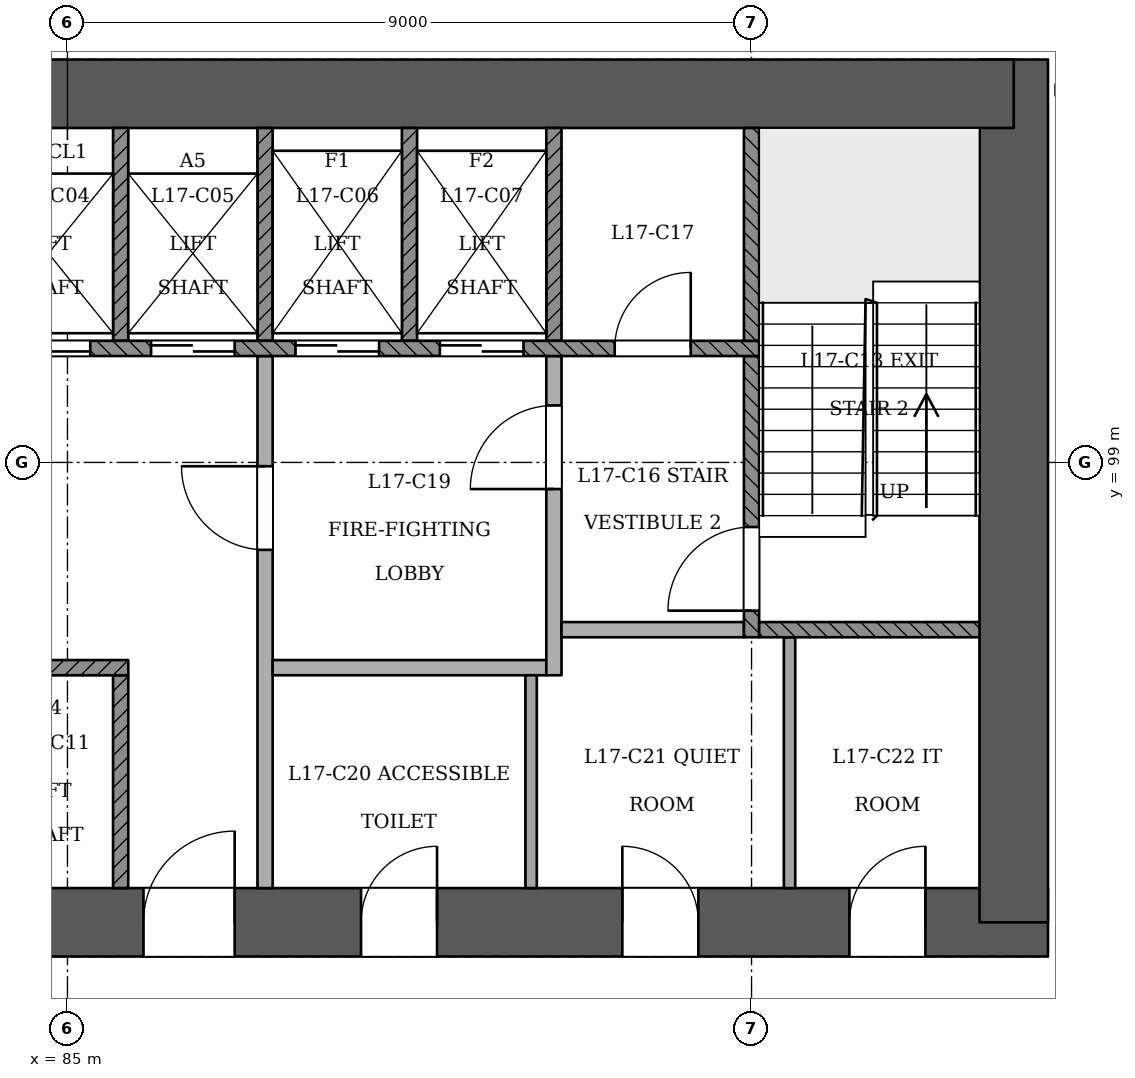
"""IFC4 building model, lengths in metres.
Left out: names, types, materials, properties, quantities, classifications, styles, units other than length and angle.
Written with IfcOpenShell. Run it as: python <this file> out.ifc"""

import sys

from ifc_helpers import new_model, si_unit, direction, frame, frame_2d, origin, place, context, subcontext, project, spatial, rectangle, extrude, element, fill, save


model = new_model("IFC4")
c1 = context("Model", 3, precision=1e-05, world=origin(), true_north=direction((0.0, 1.0)))
c2 = subcontext(c1, "Body", "Model", "MODEL_VIEW")
j1 = project(units=[si_unit("LENGTHUNIT", "METRE"), si_unit("PLANEANGLEUNIT", "RADIAN")], contexts=[c1])
p1 = place(None, origin())
s1 = spatial("IfcSite", under=j1, at=p1, CompositionType="ELEMENT")
p2 = place(p1, origin())
s2 = spatial("IfcBuilding", under=s1, at=p2, CompositionType="ELEMENT")
p3 = place(p2, frame((0.0, 0.0, 70.2)))
s3 = spatial("IfcBuildingStorey", under=s2, at=p3, CompositionType="ELEMENT", Elevation=70.2)
p4 = place(p3, frame((72.55, 92.95, 0.0), z_axis=(0.0, 0.0, 1.0), x_axis=(1.0, 0.0, 0.0)))
e1 = element("IfcWall", 1, at=p4, inside=s3, PredefinedType="SHEAR", context=c2, shape_type="SweptSolid", body=[
    extrude(rectangle(XDim=25.35, YDim=0.9, at=frame_2d((12.675, 0.0))), origin(), (0.0, 0.0, 1.0), 3.6),
])
p5 = place(p4, frame((1.25, 0.0, 0.0)))
e2 = element("IfcOpeningElement", 2, at=p5, cuts=e1, PredefinedType="OPENING", context=c2, shape_type="SweptSolid", body=[
    extrude(rectangle(XDim=1.2, YDim=2.1, at=frame_2d((0.6, 1.05))), frame((0.0, 0.46, 0.0), z_axis=(0.0, -1.0, 0.0), x_axis=(1.0, 0.0, 0.0)), (0.0, 0.0, 1.0), 0.921),
])
p6 = place(p4, frame((3.45, 0.0, 0.0)))
e3 = element("IfcOpeningElement", 3, at=p6, cuts=e1, PredefinedType="OPENING", context=c2, shape_type="SweptSolid", body=[
    extrude(rectangle(XDim=1.2, YDim=2.1, at=frame_2d((0.6, 1.05))), frame((0.0, 0.46, 0.0), z_axis=(0.0, -1.0, 0.0), x_axis=(1.0, 0.0, 0.0)), (0.0, 0.0, 1.0), 0.921),
])
p7 = place(p4, frame((13.45, 0.0, 0.0)))
e4 = element("IfcOpeningElement", 4, at=p7, cuts=e1, PredefinedType="OPENING", context=c2, shape_type="SweptSolid", body=[
    extrude(rectangle(XDim=1.2, YDim=2.1, at=frame_2d((0.6, 1.05))), frame((0.0, 0.46, 0.0), z_axis=(0.0, -1.0, 0.0), x_axis=(1.0, 0.0, 0.0)), (0.0, 0.0, 1.0), 0.921),
])
p8 = place(p4, frame((16.312, 0.0, 0.0)))
e5 = element("IfcOpeningElement", 5, at=p8, cuts=e1, PredefinedType="OPENING", context=c2, shape_type="SweptSolid", body=[
    extrude(rectangle(XDim=1.0, YDim=2.1, at=frame_2d((0.5, 1.05))), frame((0.0, 0.46, 0.0), z_axis=(0.0, -1.0, 0.0), x_axis=(1.0, 0.0, 0.0)), (0.0, 0.0, 1.0), 0.921),
])
p9 = place(p4, frame((19.75, 0.0, 0.0)))
e6 = element("IfcOpeningElement", 6, at=p9, cuts=e1, PredefinedType="OPENING", context=c2, shape_type="SweptSolid", body=[
    extrude(rectangle(XDim=1.0, YDim=2.1, at=frame_2d((0.5, 1.05))), frame((0.0, 0.46, 0.0), z_axis=(0.0, -1.0, 0.0), x_axis=(1.0, 0.0, 0.0)), (0.0, 0.0, 1.0), 0.921),
])
p10 = place(p4, frame((22.738, 0.0, 0.0)))
e7 = element("IfcOpeningElement", 7, at=p10, cuts=e1, PredefinedType="OPENING", context=c2, shape_type="SweptSolid", body=[
    extrude(rectangle(XDim=1.0, YDim=2.1, at=frame_2d((0.5, 1.05))), frame((0.0, 0.46, 0.0), z_axis=(0.0, -1.0, 0.0), x_axis=(1.0, 0.0, 0.0)), (0.0, 0.0, 1.0), 0.921),
])
p11 = place(p3, frame((97.45, 92.95, 0.0), z_axis=(0.0, 0.0, 1.0), x_axis=(0.0, 1.0, 0.0)))
e8 = element("IfcWall", 8, at=p11, inside=s3, PredefinedType="SHEAR", context=c2, shape_type="SweptSolid", body=[
    extrude(rectangle(XDim=11.35, YDim=0.9, at=frame_2d((5.675, 0.0))), origin(), (0.0, 0.0, 1.0), 3.6),
])
p12 = place(p3, frame((97.45, 103.85, 0.0), z_axis=(0.0, 0.0, 1.0), x_axis=(-1.0, 0.0, 0.0)))
e9 = element("IfcWall", 9, at=p12, inside=s3, PredefinedType="SHEAR", context=c2, shape_type="SweptSolid", body=[
    extrude(rectangle(XDim=25.35, YDim=0.9, at=frame_2d((12.675, 0.0))), origin(), (0.0, 0.0, 1.0), 3.6),
])
p13 = place(p3, frame((85.785, 59.686, 0.0), z_axis=(0.0, 0.0, 1.0), x_axis=(0.500002288388, 0.866024082579, 0.0)))
e10 = element("IfcWall", 10, at=p13, inside=s3, PredefinedType="PARTITIONING", context=c2, shape_type="SweptSolid", body=[
    extrude(rectangle(XDim=43.248, YDim=0.15, at=frame_2d((21.624, 0.0))), origin(), (0.0, 0.0, 1.0), 2.7),
])
p14 = place(p13, frame((0.256, 0.0, 0.0)))
e11 = element("IfcOpeningElement", 11, at=p14, cuts=e10, PredefinedType="OPENING", context=c2, shape_type="SweptSolid", body=[
    extrude(rectangle(XDim=1.2, YDim=2.1, at=frame_2d((0.6, 1.05))), frame((0.0, 0.085, 0.0), z_axis=(0.0, -1.0, 0.0), x_axis=(1.0, 0.0, 0.0)), (0.0, 0.0, 1.0), 0.171),
])
p15 = place(p13, frame((4.229, 0.0, 0.0)))
e12 = element("IfcOpeningElement", 12, at=p15, cuts=e10, PredefinedType="OPENING", context=c2, shape_type="SweptSolid", body=[
    extrude(rectangle(XDim=1.0, YDim=2.1, at=frame_2d((0.5, 1.05))), frame((0.0, 0.085, 0.0), z_axis=(0.0, -1.0, 0.0), x_axis=(1.0, 0.0, 0.0)), (0.0, 0.0, 1.0), 0.171),
])
p16 = place(p13, frame((10.904, 0.0, 0.0)))
e13 = element("IfcOpeningElement", 13, at=p16, cuts=e10, PredefinedType="OPENING", context=c2, shape_type="SweptSolid", body=[
    extrude(rectangle(XDim=1.0, YDim=2.1, at=frame_2d((0.5, 1.05))), frame((0.0, 0.085, 0.0), z_axis=(0.0, -1.0, 0.0), x_axis=(1.0, 0.0, 0.0)), (0.0, 0.0, 1.0), 0.171),
])
p17 = place(p13, frame((13.345, 0.0, 0.0)))
e14 = element("IfcOpeningElement", 14, at=p17, cuts=e10, PredefinedType="OPENING", context=c2, shape_type="SweptSolid", body=[
    extrude(rectangle(XDim=1.0, YDim=2.1, at=frame_2d((0.5, 1.05))), frame((0.0, 0.085, 0.0), z_axis=(0.0, -1.0, 0.0), x_axis=(1.0, 0.0, 0.0)), (0.0, 0.0, 1.0), 0.171),
])
p18 = place(p13, frame((21.024, 0.0, 0.0)))
e15 = element("IfcOpeningElement", 15, at=p18, cuts=e10, PredefinedType="OPENING", context=c2, shape_type="SweptSolid", body=[
    extrude(rectangle(XDim=1.2, YDim=2.1, at=frame_2d((0.6, 1.05))), frame((0.0, 0.085, 0.0), z_axis=(0.0, -1.0, 0.0), x_axis=(1.0, 0.0, 0.0)), (0.0, 0.0, 1.0), 0.171),
])
p19 = place(p13, frame((28.904, 0.0, 0.0)))
e16 = element("IfcOpeningElement", 16, at=p19, cuts=e10, PredefinedType="OPENING", context=c2, shape_type="SweptSolid", body=[
    extrude(rectangle(XDim=1.0, YDim=2.1, at=frame_2d((0.5, 1.05))), frame((0.0, 0.085, 0.0), z_axis=(0.0, -1.0, 0.0), x_axis=(1.0, 0.0, 0.0)), (0.0, 0.0, 1.0), 0.171),
])
p20 = place(p13, frame((31.195, 0.0, 0.0)))
e17 = element("IfcOpeningElement", 17, at=p20, cuts=e10, PredefinedType="OPENING", context=c2, shape_type="SweptSolid", body=[
    extrude(rectangle(XDim=1.1, YDim=2.1, at=frame_2d((0.55, 1.05))), frame((0.0, 0.085, 0.0), z_axis=(0.0, -1.0, 0.0), x_axis=(1.0, 0.0, 0.0)), (0.0, 0.0, 1.0), 0.171),
])
p21 = place(p13, frame((38.618, 0.0, 0.0)))
e18 = element("IfcOpeningElement", 18, at=p21, cuts=e10, PredefinedType="OPENING", context=c2, shape_type="SweptSolid", body=[
    extrude(rectangle(XDim=1.2, YDim=2.1, at=frame_2d((0.6, 1.05))), frame((0.0, 0.085, 0.0), z_axis=(0.0, -1.0, 0.0), x_axis=(1.0, 0.0, 0.0)), (0.0, 0.0, 1.0), 0.171),
])
p22 = place(p3, frame((99.491, 103.9, 0.0), z_axis=(0.0, 0.0, 1.0), x_axis=(-1.0, 0.0, 0.0)))
e19 = element("IfcWall", 19, at=p22, inside=s3, PredefinedType="PARTITIONING", context=c2, shape_type="SweptSolid", body=[
    extrude(rectangle(XDim=1.491, YDim=0.15, at=frame_2d((0.746, 0.0))), origin(), (0.0, 0.0, 1.0), 3.1),
])
p23 = place(p3, frame((85.7, 93.4, 0.0), z_axis=(0.0, 0.0, 1.0), x_axis=(0.0, 1.0, 0.0)))
e20 = element("IfcWall", 20, at=p23, inside=s3, PredefinedType="SOLIDWALL", context=c2, shape_type="SweptSolid", body=[
    extrude(rectangle(XDim=2.8, YDim=0.2, at=frame_2d((1.4, 0.0))), origin(), (0.0, 0.0, 1.0), 3.1),
])
p24 = place(p3, frame((87.6, 93.4, 0.0), z_axis=(0.0, 0.0, 1.0), x_axis=(0.0, 1.0, 0.0)))
e21 = element("IfcWall", 21, at=p24, inside=s3, PredefinedType="PARTITIONING", context=c2, shape_type="SweptSolid", body=[
    extrude(rectangle(XDim=7.0, YDim=0.2, at=frame_2d((3.5, 0.0))), origin(), (0.0, 0.0, 1.0), 3.1),
])
p25 = place(p24, frame((4.45, 0.0, 0.0)))
e22 = element("IfcOpeningElement", 22, at=p25, cuts=e21, PredefinedType="OPENING", context=c2, shape_type="SweptSolid", body=[
    extrude(rectangle(XDim=1.1, YDim=2.1, at=frame_2d((0.55, 1.05))), frame((0.0, 0.11, 0.0), z_axis=(0.0, -1.0, 0.0), x_axis=(1.0, 0.0, 0.0)), (0.0, 0.0, 1.0), 0.221),
])
p26 = place(p3, frame((91.1, 93.4, 0.0), z_axis=(0.0, 0.0, 1.0), x_axis=(0.0, 1.0, 0.0)))
e23 = element("IfcWall", 23, at=p26, inside=s3, PredefinedType="PARTITIONING", context=c2, shape_type="SweptSolid", body=[
    extrude(rectangle(XDim=2.8, YDim=0.15, at=frame_2d((1.4, 0.0))), origin(), (0.0, 0.0, 1.0), 3.1),
])
p27 = place(p3, frame((94.5, 93.4, 0.0), z_axis=(0.0, 0.0, 1.0), x_axis=(0.0, 1.0, 0.0)))
e24 = element("IfcWall", 24, at=p27, inside=s3, PredefinedType="PARTITIONING", context=c2, shape_type="SweptSolid", body=[
    extrude(rectangle(XDim=3.3, YDim=0.15, at=frame_2d((1.65, 0.0))), origin(), (0.0, 0.0, 1.0), 3.1),
])
p28 = place(p3, frame((78.0, 96.3, 0.0), z_axis=(0.0, 0.0, 1.0), x_axis=(1.0, 0.0, 0.0)))
e25 = element("IfcWall", 25, at=p28, inside=s3, PredefinedType="SOLIDWALL", context=c2, shape_type="SweptSolid", body=[
    extrude(rectangle(XDim=7.8, YDim=0.2, at=frame_2d((3.9, 0.0))), origin(), (0.0, 0.0, 1.0), 3.1),
])
p29 = place(p3, frame((87.7, 96.3, 0.0), z_axis=(0.0, 0.0, 1.0), x_axis=(1.0, 0.0, 0.0)))
e26 = element("IfcWall", 26, at=p29, inside=s3, PredefinedType="PARTITIONING", context=c2, shape_type="SweptSolid", body=[
    extrude(rectangle(XDim=3.6, YDim=0.2, at=frame_2d((1.8, 0.0))), origin(), (0.0, 0.0, 1.0), 3.1),
])
p30 = place(p3, frame((91.4, 96.2, 0.0), z_axis=(0.0, 0.0, 1.0), x_axis=(0.0, 1.0, 0.0)))
e27 = element("IfcWall", 27, at=p30, inside=s3, PredefinedType="PARTITIONING", context=c2, shape_type="SweptSolid", body=[
    extrude(rectangle(XDim=4.2, YDim=0.2, at=frame_2d((2.1, 0.0))), origin(), (0.0, 0.0, 1.0), 3.1),
])
p31 = place(p30, frame((2.45, 0.0, 0.0)))
e28 = element("IfcOpeningElement", 28, at=p31, cuts=e27, PredefinedType="OPENING", context=c2, shape_type="SweptSolid", body=[
    extrude(rectangle(XDim=1.1, YDim=2.1, at=frame_2d((0.55, 1.05))), frame((0.0, 0.11, 0.0), z_axis=(0.0, -1.0, 0.0), x_axis=(1.0, 0.0, 0.0)), (0.0, 0.0, 1.0), 0.221),
])
p32 = place(p3, frame((91.5, 96.8, 0.0), z_axis=(0.0, 0.0, 1.0), x_axis=(1.0, 0.0, 0.0)))
e29 = element("IfcWall", 29, at=p32, inside=s3, PredefinedType="PARTITIONING", context=c2, shape_type="SweptSolid", body=[
    extrude(rectangle(XDim=2.4, YDim=0.2, at=frame_2d((1.2, 0.0))), origin(), (0.0, 0.0, 1.0), 3.1),
])
p33 = place(p3, frame((94.0, 96.7, 0.0), z_axis=(0.0, 0.0, 1.0), x_axis=(0.0, 1.0, 0.0)))
e30 = element("IfcWall", 30, at=p33, inside=s3, PredefinedType="SOLIDWALL", context=c2, shape_type="SweptSolid", body=[
    extrude(rectangle(XDim=3.7, YDim=0.2, at=frame_2d((1.85, 0.0))), origin(), (0.0, 0.0, 1.0), 3.1),
])
p34 = place(p33, frame((0.35, 0.0, 0.0)))
e31 = element("IfcOpeningElement", 31, at=p34, cuts=e30, PredefinedType="OPENING", context=c2, shape_type="SweptSolid", body=[
    extrude(rectangle(XDim=1.1, YDim=2.1, at=frame_2d((0.55, 1.05))), frame((0.0, 0.11, 0.0), z_axis=(0.0, -1.0, 0.0), x_axis=(1.0, 0.0, 0.0)), (0.0, 0.0, 1.0), 0.221),
])
p35 = place(p3, frame((94.1, 96.8, 0.0), z_axis=(0.0, 0.0, 1.0), x_axis=(1.0, 0.0, 0.0)))
e32 = element("IfcWall", 32, at=p35, inside=s3, PredefinedType="SOLIDWALL", context=c2, shape_type="SweptSolid", body=[
    extrude(rectangle(XDim=2.9, YDim=0.2, at=frame_2d((1.45, 0.0))), origin(), (0.0, 0.0, 1.0), 3.1),
])
p36 = place(p3, frame((75.9, 100.5, 0.0), z_axis=(0.0, 0.0, 1.0), x_axis=(1.0, 0.0, 0.0)))
e33 = element("IfcWall", 33, at=p36, inside=s3, PredefinedType="SOLIDWALL", context=c2, shape_type="SweptSolid", body=[
    extrude(rectangle(XDim=18.2, YDim=0.2, at=frame_2d((9.1, 0.0))), origin(), (0.0, 0.0, 1.0), 3.1),
])
p37 = place(p36, frame((2.6, 0.0, 0.0)))
e34 = element("IfcOpeningElement", 34, at=p37, cuts=e33, PredefinedType="OPENING", context=c2, shape_type="SweptSolid", body=[
    extrude(rectangle(XDim=1.1, YDim=2.1, at=frame_2d((0.55, 1.05))), frame((0.0, 0.11, 0.0), z_axis=(0.0, -1.0, 0.0), x_axis=(1.0, 0.0, 0.0)), (0.0, 0.0, 1.0), 0.221),
])
p38 = place(p36, frame((4.5, 0.0, 0.0)))
e35 = element("IfcOpeningElement", 35, at=p38, cuts=e33, PredefinedType="OPENING", context=c2, shape_type="SweptSolid", body=[
    extrude(rectangle(XDim=1.1, YDim=2.1, at=frame_2d((0.55, 1.05))), frame((0.0, 0.11, 0.0), z_axis=(0.0, -1.0, 0.0), x_axis=(1.0, 0.0, 0.0)), (0.0, 0.0, 1.0), 0.221),
])
p39 = place(p36, frame((6.4, 0.0, 0.0)))
e36 = element("IfcOpeningElement", 36, at=p39, cuts=e33, PredefinedType="OPENING", context=c2, shape_type="SweptSolid", body=[
    extrude(rectangle(XDim=1.1, YDim=2.1, at=frame_2d((0.55, 1.05))), frame((0.0, 0.11, 0.0), z_axis=(0.0, -1.0, 0.0), x_axis=(1.0, 0.0, 0.0)), (0.0, 0.0, 1.0), 0.221),
])
p40 = place(p36, frame((8.3, 0.0, 0.0)))
e37 = element("IfcOpeningElement", 37, at=p40, cuts=e33, PredefinedType="OPENING", context=c2, shape_type="SweptSolid", body=[
    extrude(rectangle(XDim=1.1, YDim=2.1, at=frame_2d((0.55, 1.05))), frame((0.0, 0.11, 0.0), z_axis=(0.0, -1.0, 0.0), x_axis=(1.0, 0.0, 0.0)), (0.0, 0.0, 1.0), 0.221),
])
p41 = place(p36, frame((10.2, 0.0, 0.0)))
e38 = element("IfcOpeningElement", 38, at=p41, cuts=e33, PredefinedType="OPENING", context=c2, shape_type="SweptSolid", body=[
    extrude(rectangle(XDim=1.1, YDim=2.1, at=frame_2d((0.55, 1.05))), frame((0.0, 0.11, 0.0), z_axis=(0.0, -1.0, 0.0), x_axis=(1.0, 0.0, 0.0)), (0.0, 0.0, 1.0), 0.221),
])
p42 = place(p36, frame((12.1, 0.0, 0.0)))
e39 = element("IfcOpeningElement", 39, at=p42, cuts=e33, PredefinedType="OPENING", context=c2, shape_type="SweptSolid", body=[
    extrude(rectangle(XDim=1.1, YDim=2.1, at=frame_2d((0.55, 1.05))), frame((0.0, 0.11, 0.0), z_axis=(0.0, -1.0, 0.0), x_axis=(1.0, 0.0, 0.0)), (0.0, 0.0, 1.0), 0.221),
])
p43 = place(p36, frame((14.0, 0.0, 0.0)))
e40 = element("IfcOpeningElement", 40, at=p43, cuts=e33, PredefinedType="OPENING", context=c2, shape_type="SweptSolid", body=[
    extrude(rectangle(XDim=1.1, YDim=2.1, at=frame_2d((0.55, 1.05))), frame((0.0, 0.11, 0.0), z_axis=(0.0, -1.0, 0.0), x_axis=(1.0, 0.0, 0.0)), (0.0, 0.0, 1.0), 0.221),
])
p44 = place(p36, frame((0.65, 0.0, 0.0)))
e41 = element("IfcOpeningElement", 41, at=p44, cuts=e33, PredefinedType="OPENING", context=c2, shape_type="SweptSolid", body=[
    extrude(rectangle(XDim=1.0, YDim=2.1, at=frame_2d((0.5, 1.05))), frame((0.0, 0.11, 0.0), z_axis=(0.0, -1.0, 0.0), x_axis=(1.0, 0.0, 0.0)), (0.0, 0.0, 1.0), 0.221),
])
p45 = place(p36, frame((16.3, 0.0, 0.0)))
e42 = element("IfcOpeningElement", 42, at=p45, cuts=e33, PredefinedType="OPENING", context=c2, shape_type="SweptSolid", body=[
    extrude(rectangle(XDim=1.0, YDim=2.1, at=frame_2d((0.5, 1.05))), frame((0.0, 0.11, 0.0), z_axis=(0.0, -1.0, 0.0), x_axis=(1.0, 0.0, 0.0)), (0.0, 0.0, 1.0), 0.221),
])
for number, where, z_axis, x_axis in (
    (43, (85.7, 100.6, 0.0), (0.0, 0.0, 1.0), (0.0, 1.0, 0.0)),
    (44, (87.6, 100.6, 0.0), (0.0, 0.0, 1.0), (0.0, 1.0, 0.0)),
    (45, (89.5, 100.6, 0.0), (0.0, 0.0, 1.0), (0.0, 1.0, 0.0)),
    (46, (91.4, 100.6, 0.0), (0.0, 0.0, 1.0), (0.0, 1.0, 0.0)),
    (47, (94.0, 100.6, 0.0), (0.0, 0.0, 1.0), (0.0, 1.0, 0.0)),
):
    element("IfcWall", number, at=place(p3, frame(where, z_axis=z_axis, x_axis=x_axis)), inside=s3, PredefinedType="SOLIDWALL", context=c2, shape_type="SweptSolid", body=[
        extrude(rectangle(XDim=2.8, YDim=0.2, at=frame_2d((1.4, 0.0))), origin(), (0.0, 0.0, 1.0), 3.1),
    ])
p46 = place(p40, origin())
e48 = element("IfcDoor", 48, at=p46, inside=s3, OperationType="SLIDING_TO_LEFT", PredefinedType="NOTDEFINED", context=c2, shape_type="SweptSolid", body=[
    extrude(rectangle(XDim=1.1, YDim=2.1, at=frame_2d((0.55, 1.05))), frame((0.0, 0.025, 0.0), z_axis=(0.0, -1.0, 0.0), x_axis=(1.0, 0.0, 0.0)), (0.0, 0.0, 1.0), 0.05),
])
fill(e37, e48)
p47 = place(p41, origin())
e49 = element("IfcDoor", 49, at=p47, inside=s3, OperationType="SLIDING_TO_RIGHT", PredefinedType="NOTDEFINED", context=c2, shape_type="SweptSolid", body=[
    extrude(rectangle(XDim=1.1, YDim=2.1, at=frame_2d((0.55, 1.05))), frame((0.0, 0.025, 0.0), z_axis=(0.0, -1.0, 0.0), x_axis=(1.0, 0.0, 0.0)), (0.0, 0.0, 1.0), 0.05),
])
fill(e38, e49)
p48 = place(p42, origin())
e50 = element("IfcDoor", 50, at=p48, inside=s3, OperationType="SLIDING_TO_RIGHT", PredefinedType="NOTDEFINED", context=c2, shape_type="SweptSolid", body=[
    extrude(rectangle(XDim=1.1, YDim=2.1, at=frame_2d((0.55, 1.05))), frame((0.0, 0.025, 0.0), z_axis=(0.0, -1.0, 0.0), x_axis=(1.0, 0.0, 0.0)), (0.0, 0.0, 1.0), 0.05),
])
fill(e39, e50)
p49 = place(p43, origin())
e51 = element("IfcDoor", 51, at=p49, inside=s3, OperationType="SLIDING_TO_LEFT", PredefinedType="NOTDEFINED", context=c2, shape_type="SweptSolid", body=[
    extrude(rectangle(XDim=1.1, YDim=2.1, at=frame_2d((0.55, 1.05))), frame((0.0, 0.025, 0.0), z_axis=(0.0, -1.0, 0.0), x_axis=(1.0, 0.0, 0.0)), (0.0, 0.0, 1.0), 0.05),
])
fill(e40, e51)
p50 = place(p34, origin())
e52 = element("IfcDoor", 52, at=p50, inside=s3, OperationType="SINGLE_SWING_LEFT", PredefinedType="NOTDEFINED", context=c2, shape_type="SweptSolid", body=[
    extrude(rectangle(XDim=1.1, YDim=2.1, at=frame_2d((0.55, 1.05))), frame((0.0, 0.025, 0.0), z_axis=(0.0, -1.0, 0.0), x_axis=(1.0, 0.0, 0.0)), (0.0, 0.0, 1.0), 0.05),
])
fill(e31, e52)
p51 = place(p25, origin())
e53 = element("IfcDoor", 53, at=p51, inside=s3, OperationType="SINGLE_SWING_RIGHT", PredefinedType="NOTDEFINED", context=c2, shape_type="SweptSolid", body=[
    extrude(rectangle(XDim=1.1, YDim=2.1, at=frame_2d((0.55, 1.05))), frame((0.0, 0.025, 0.0), z_axis=(0.0, -1.0, 0.0), x_axis=(1.0, 0.0, 0.0)), (0.0, 0.0, 1.0), 0.05),
])
fill(e22, e53)
p52 = place(p31, origin())
e54 = element("IfcDoor", 54, at=p52, inside=s3, OperationType="SINGLE_SWING_LEFT", PredefinedType="NOTDEFINED", context=c2, shape_type="SweptSolid", body=[
    extrude(rectangle(XDim=1.1, YDim=2.1, at=frame_2d((0.55, 1.05))), frame((0.0, 0.025, 0.0), z_axis=(0.0, -1.0, 0.0), x_axis=(1.0, 0.0, 0.0)), (0.0, 0.0, 1.0), 0.05),
])
fill(e28, e54)
p53 = place(p7, origin())
e55 = element("IfcDoor", 55, at=p53, inside=s3, OperationType="SINGLE_SWING_RIGHT", PredefinedType="NOTDEFINED", context=c2, shape_type="SweptSolid", body=[
    extrude(rectangle(XDim=1.2, YDim=2.1, at=frame_2d((0.6, 1.05))), frame((0.0, 0.025, 0.0), z_axis=(0.0, -1.0, 0.0), x_axis=(1.0, 0.0, 0.0)), (0.0, 0.0, 1.0), 0.05),
])
fill(e4, e55)
p54 = place(p45, origin())
e56 = element("IfcDoor", 56, at=p54, inside=s3, OperationType="SINGLE_SWING_RIGHT", PredefinedType="NOTDEFINED", context=c2, shape_type="SweptSolid", body=[
    extrude(rectangle(XDim=1.0, YDim=2.1, at=frame_2d((0.5, 1.05))), frame((0.0, 0.025, 0.0), z_axis=(0.0, -1.0, 0.0), x_axis=(1.0, 0.0, 0.0)), (0.0, 0.0, 1.0), 0.05),
])
fill(e42, e56)
p55 = place(p8, origin())
e57 = element("IfcDoor", 57, at=p55, inside=s3, OperationType="SINGLE_SWING_RIGHT", PredefinedType="NOTDEFINED", context=c2, shape_type="SweptSolid", body=[
    extrude(rectangle(XDim=1.0, YDim=2.1, at=frame_2d((0.5, 1.05))), frame((0.0, 0.025, 0.0), z_axis=(0.0, -1.0, 0.0), x_axis=(1.0, 0.0, 0.0)), (0.0, 0.0, 1.0), 0.05),
])
fill(e5, e57)
p56 = place(p9, origin())
e58 = element("IfcDoor", 58, at=p56, inside=s3, OperationType="SINGLE_SWING_LEFT", PredefinedType="NOTDEFINED", context=c2, shape_type="SweptSolid", body=[
    extrude(rectangle(XDim=1.0, YDim=2.1, at=frame_2d((0.5, 1.05))), frame((0.0, 0.025, 0.0), z_axis=(0.0, -1.0, 0.0), x_axis=(1.0, 0.0, 0.0)), (0.0, 0.0, 1.0), 0.05),
])
fill(e6, e58)
p57 = place(p10, origin())
e59 = element("IfcDoor", 59, at=p57, inside=s3, OperationType="SINGLE_SWING_RIGHT", PredefinedType="NOTDEFINED", context=c2, shape_type="SweptSolid", body=[
    extrude(rectangle(XDim=1.0, YDim=2.1, at=frame_2d((0.5, 1.05))), frame((0.0, 0.025, 0.0), z_axis=(0.0, -1.0, 0.0), x_axis=(1.0, 0.0, 0.0)), (0.0, 0.0, 1.0), 0.05),
])
fill(e7, e59)
save(model, sys.argv[1])
